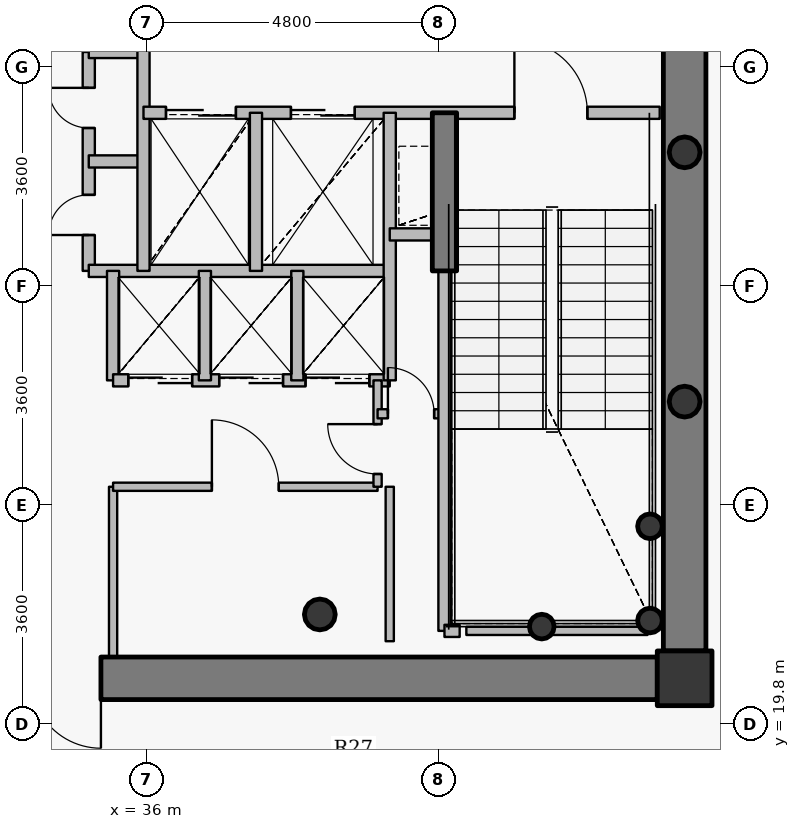
"""IFC4 building model, lengths in metres.
Left out: names, types, materials, properties, quantities, classifications, styles, units other than length and angle.
Written with IfcOpenShell. Run it as: python <this file> out.ifc"""

import sys

from ifc_helpers import new_model, si_unit, direction, frame, frame_2d, origin, origin_2d, place, context, subcontext, project, spatial, rectangle, hollow_circle, extrude, source, transform, mapped, element, fill, save


model = new_model("IFC4")
c1 = context("Model", 3, precision=1e-05, world=origin(), true_north=direction((0.0, 1.0)))
c2 = subcontext(c1, "Body", "Model", "MODEL_VIEW")
j1 = project(units=[si_unit("LENGTHUNIT", "METRE"), si_unit("PLANEANGLEUNIT", "RADIAN")], contexts=[c1])
p1 = place(None, origin())
s1 = spatial("IfcSite", under=j1, at=p1, CompositionType="ELEMENT")
p2 = place(p1, origin())
s2 = spatial("IfcBuilding", under=s1, at=p2, CompositionType="ELEMENT")
p3 = place(p2, frame((0.0, 0.0, 335.4)))
s3 = spatial("IfcBuildingStorey", under=s2, at=p3, CompositionType="ELEMENT", Elevation=335.4)
p4 = place(p3, frame((44.85, 20.55, 0.0), z_axis=(0.0, 0.0, 1.0), x_axis=(1.0, 0.0, 0.0)))
e1 = element("IfcColumn", 1, at=p4, inside=s3, PredefinedType="COLUMN", context=c2, shape_type="SweptSolid", body=[
    extrude(rectangle(XDim=0.9, YDim=0.9, at=origin_2d()), origin(), (0.0, 0.0, 1.0), 3.8),
])
p5 = place(p3, frame((38.85, 21.6, 0.0), z_axis=(0.0, 0.0, 1.0), x_axis=(1.0, 0.0, 0.0)))
e2 = element("IfcColumn", 2, at=p5, inside=s3, PredefinedType="COLUMN", context=c2, shape_type="SweptSolid", body=[
    extrude(hollow_circle(Radius=0.254, WallThickness=0.02, at=origin_2d()), origin(), (0.0, 0.0, 1.0), 3.8),
])
for number, where, z_axis, x_axis in (
    (3, (44.28, 21.5, 0.0), (0.0, 0.0, 1.0), (1.0, 0.0, 0.0)),
    (4, (44.28, 23.05, 0.0), (0.0, 0.0, 1.0), (1.0, 0.0, 0.0)),
    (5, (42.5, 21.4, 0.0), (0.0, 0.0, 1.0), (1.0, 0.0, 0.0)),
):
    element("IfcColumn", number, at=place(p3, frame(where, z_axis=z_axis, x_axis=x_axis)), inside=s3, PredefinedType="COLUMN", context=c2, shape_type="SweptSolid", body=[
        extrude(hollow_circle(Radius=0.203, WallThickness=0.016, at=origin_2d()), origin(), (0.0, 0.0, 1.0), 3.8),
    ])
p6 = place(p3, frame((44.85, 33.0, 0.0), z_axis=(0.0, 0.0, 1.0), x_axis=(0.0, -1.0, 0.0)))
e6 = element("IfcWall", 6, at=p6, inside=s3, PredefinedType="SHEAR", context=c2, shape_type="SweptSolid", body=[
    extrude(rectangle(XDim=12.0, YDim=0.7, at=frame_2d((6.0, 0.0))), origin(), (0.0, 0.0, 1.0), 3.1),
])
p7 = place(p3, frame((44.4, 20.55, 0.0), z_axis=(0.0, 0.0, 1.0), x_axis=(-1.0, 0.0, 0.0)))
e7 = element("IfcWall", 7, at=p7, inside=s3, PredefinedType="SHEAR", context=c2, shape_type="SweptSolid", body=[
    extrude(rectangle(XDim=16.8, YDim=0.7, at=frame_2d((8.4, 0.0))), origin(), (0.0, 0.0, 1.0), 3.1),
])
p8 = place(p7, frame((13.0, 0.0, 0.0)))
e8 = element("IfcOpeningElement", 8, at=p8, cuts=e7, PredefinedType="OPENING", context=c2, shape_type="SweptSolid", body=[
    extrude(rectangle(XDim=1.15, YDim=2.15, at=origin_2d()), frame((0.575, 0.36, 1.075), z_axis=(0.0, -1.0, 0.0), x_axis=(1.0, 0.0, 0.0)), (0.0, 0.0, 1.0), 0.72),
])
p9 = place(p7, frame((9.15, 0.0, 0.0)))
e9 = element("IfcOpeningElement", 9, at=p9, cuts=e7, PredefinedType="OPENING", context=c2, shape_type="SweptSolid", body=[
    extrude(rectangle(XDim=1.15, YDim=2.15, at=origin_2d()), frame((0.575, 0.36, 1.075), z_axis=(0.0, -1.0, 0.0), x_axis=(1.0, 0.0, 0.0)), (0.0, 0.0, 1.0), 0.72),
])
p10 = place(p3, frame((40.9, 27.25, 0.0), z_axis=(0.0, 0.0, 1.0), x_axis=(0.0, 1.0, 0.0)))
e10 = element("IfcWall", 10, at=p10, inside=s3, PredefinedType="SHEAR", context=c2, shape_type="SweptSolid", body=[
    extrude(rectangle(XDim=2.6, YDim=0.4, at=frame_2d((1.3, 0.0))), origin(), (0.0, 0.0, 1.0), 3.15),
])
for number, where, z_axis, x_axis in (
    (11, (44.85, 25.1, 0.0), (0.0, 0.0, 1.0), (1.0, 0.0, 0.0)),
    (12, (44.85, 29.2, 0.0), (0.0, 0.0, 1.0), (1.0, 0.0, 0.0)),
):
    element("IfcColumn", number, at=place(p3, frame(where, z_axis=z_axis, x_axis=x_axis)), inside=s3, PredefinedType="COLUMN", context=c2, shape_type="SweptSolid", body=[
        extrude(hollow_circle(Radius=0.254, WallThickness=0.02, at=origin_2d()), origin(), (0.0, 0.0, 1.0), 3.8),
    ])
p11 = place(p3, frame((35.05, 27.25, 0.0), z_axis=(0.0, 0.0, 1.0), x_axis=(0.0, 1.0, 0.0)))
e13 = element("IfcWall", 13, at=p11, inside=s3, PredefinedType="PARTITIONING", context=c2, shape_type="SweptSolid", body=[
    extrude(rectangle(XDim=3.6, YDim=0.2, at=frame_2d((1.8, 0.0))), origin(), (0.0, 0.0, 1.0), 3.55),
])
p12 = place(p11, frame((0.59, 0.0, 0.0)))
e14 = element("IfcOpeningElement", 14, at=p12, cuts=e13, PredefinedType="OPENING", context=c2, shape_type="SweptSolid", body=[
    extrude(rectangle(XDim=0.66, YDim=2.05, at=origin_2d()), frame((0.33, 0.11, 1.025), z_axis=(0.0, -1.0, 0.0), x_axis=(1.0, 0.0, 0.0)), (0.0, 0.0, 1.0), 0.22),
])
p13 = place(p11, frame((2.35, 0.0, 0.0)))
e15 = element("IfcOpeningElement", 15, at=p13, cuts=e13, PredefinedType="OPENING", context=c2, shape_type="SweptSolid", body=[
    extrude(rectangle(XDim=0.66, YDim=2.05, at=origin_2d()), frame((0.33, 0.11, 1.025), z_axis=(0.0, -1.0, 0.0), x_axis=(1.0, 0.0, 0.0)), (0.0, 0.0, 1.0), 0.22),
])
p14 = place(p3, frame((35.05, 27.25, 0.0), z_axis=(0.0, 0.0, 1.0), x_axis=(1.0, 0.0, 0.0)))
e16 = element("IfcWall", 16, at=p14, inside=s3, PredefinedType="PARTITIONING", context=c2, shape_type="SweptSolid", body=[
    extrude(rectangle(XDim=4.95, YDim=0.2, at=frame_2d((2.475, 0.0))), origin(), (0.0, 0.0, 1.0), 3.135),
])
for number, where, z_axis, x_axis in (
    (17, (35.05, 29.05, 0.0), (0.0, 0.0, 1.0), (1.0, 0.0, 0.0)),
    (18, (35.05, 30.85, 0.0), (0.0, 0.0, 1.0), (1.0, 0.0, 0.0)),
):
    element("IfcWall", number, at=place(p3, frame(where, z_axis=z_axis, x_axis=x_axis)), inside=s3, PredefinedType="PARTITIONING", context=c2, shape_type="SweptSolid", body=[
        extrude(rectangle(XDim=0.9, YDim=0.2, at=frame_2d((0.45, 0.0))), origin(), (0.0, 0.0, 1.0), 3.55),
    ])
p15 = place(p3, frame((35.45, 20.9, 0.0), z_axis=(0.0, 0.0, 1.0), x_axis=(0.0, 1.0, 0.0)))
e19 = element("IfcWall", 19, at=p15, inside=s3, PredefinedType="PARTITIONING", context=c2, shape_type="SweptSolid", body=[
    extrude(rectangle(XDim=2.8, YDim=0.135, at=frame_2d((1.4, 0.0))), origin(), (0.0, 0.0, 1.0), 3.135),
])
p16 = place(p3, frame((35.45, 23.7, 0.0), z_axis=(0.0, 0.0, 1.0), x_axis=(1.0, 0.0, 0.0)))
e20 = element("IfcWall", 20, at=p16, inside=s3, PredefinedType="PARTITIONING", context=c2, shape_type="SweptSolid", body=[
    extrude(rectangle(XDim=4.35, YDim=0.135, at=frame_2d((2.175, 0.0))), origin(), (0.0, 0.0, 1.0), 3.135),
])
p17 = place(p16, frame((1.625, 0.0, 0.0)))
e21 = element("IfcOpeningElement", 21, at=p17, cuts=e20, PredefinedType="OPENING", context=c2, shape_type="SweptSolid", body=[
    extrude(rectangle(XDim=1.1, YDim=2.15, at=origin_2d()), frame((0.55, 0.078, 1.075), z_axis=(0.0, -1.0, 0.0), x_axis=(1.0, 0.0, 0.0)), (0.0, 0.0, 1.0), 0.155),
])
p18 = place(p3, frame((35.45, 25.45, 0.0), z_axis=(0.0, 0.0, 1.0), x_axis=(0.0, 1.0, 0.0)))
e22 = element("IfcWall", 22, at=p18, inside=s3, PredefinedType="PARTITIONING", context=c2, shape_type="SweptSolid", body=[
    extrude(rectangle(XDim=1.8, YDim=0.2, at=frame_2d((0.9, 0.0))), origin(), (0.0, 0.0, 1.0), 3.55),
])
p19 = place(p3, frame((35.45, 25.45, 0.0), z_axis=(0.0, 0.0, 1.0), x_axis=(1.0, 0.0, 0.0)))
e23 = element("IfcWall", 23, at=p19, inside=s3, PredefinedType="PARTITIONING", context=c2, shape_type="SweptSolid", body=[
    extrude(rectangle(XDim=4.55, YDim=0.2, at=frame_2d((2.275, 0.0))), origin(), (0.0, 0.0, 1.0), 3.135),
])
p20 = place(p19, frame((0.25, 0.0, 0.0)))
e24 = element("IfcOpeningElement", 24, at=p20, cuts=e23, PredefinedType="OPENING", context=c2, shape_type="SweptSolid", body=[
    extrude(rectangle(XDim=1.05, YDim=2.15, at=origin_2d()), frame((0.525, 0.11, 1.075), z_axis=(0.0, -1.0, 0.0), x_axis=(1.0, 0.0, 0.0)), (0.0, 0.0, 1.0), 0.22),
])
p21 = place(p19, frame((1.745, 0.0, 0.0)))
e25 = element("IfcOpeningElement", 25, at=p21, cuts=e23, PredefinedType="OPENING", context=c2, shape_type="SweptSolid", body=[
    extrude(rectangle(XDim=1.05, YDim=2.15, at=origin_2d()), frame((0.525, 0.11, 1.075), z_axis=(0.0, -1.0, 0.0), x_axis=(1.0, 0.0, 0.0)), (0.0, 0.0, 1.0), 0.22),
])
p22 = place(p19, frame((3.165, 0.0, 0.0)))
e26 = element("IfcOpeningElement", 26, at=p22, cuts=e23, PredefinedType="OPENING", context=c2, shape_type="SweptSolid", body=[
    extrude(rectangle(XDim=1.05, YDim=2.15, at=origin_2d()), frame((0.525, 0.11, 1.075), z_axis=(0.0, -1.0, 0.0), x_axis=(1.0, 0.0, 0.0)), (0.0, 0.0, 1.0), 0.22),
])
p23 = place(p3, frame((35.95, 27.25, 0.0), z_axis=(0.0, 0.0, 1.0), x_axis=(0.0, 1.0, 0.0)))
e27 = element("IfcWall", 27, at=p23, inside=s3, PredefinedType="PARTITIONING", context=c2, shape_type="SweptSolid", body=[
    extrude(rectangle(XDim=3.8, YDim=0.2, at=frame_2d((1.9, 0.0))), origin(), (0.0, 0.0, 1.0), 3.55),
])
p24 = place(p3, frame((35.95, 29.85, 0.0), z_axis=(0.0, 0.0, 1.0), x_axis=(1.0, 0.0, 0.0)))
e28 = element("IfcWall", 28, at=p24, inside=s3, PredefinedType="PARTITIONING", context=c2, shape_type="SweptSolid", body=[
    extrude(rectangle(XDim=8.49, YDim=0.2, at=frame_2d((4.245, 0.0))), origin(), (0.0, 0.0, 1.0), 3.135),
])
p25 = place(p24, frame((6.1, 0.0, 0.0)))
e29 = element("IfcOpeningElement", 29, at=p25, cuts=e28, PredefinedType="OPENING", context=c2, shape_type="SweptSolid", body=[
    extrude(rectangle(XDim=1.2, YDim=2.15, at=origin_2d()), frame((0.6, 0.11, 1.075), z_axis=(0.0, -1.0, 0.0), x_axis=(1.0, 0.0, 0.0)), (0.0, 0.0, 1.0), 0.22),
])
p26 = place(p24, frame((0.37, 0.0, 0.0)))
e30 = element("IfcOpeningElement", 30, at=p26, cuts=e28, PredefinedType="OPENING", context=c2, shape_type="SweptSolid", body=[
    extrude(rectangle(XDim=1.15, YDim=2.15, at=origin_2d()), frame((0.575, 0.11, 1.075), z_axis=(0.0, -1.0, 0.0), x_axis=(1.0, 0.0, 0.0)), (0.0, 0.0, 1.0), 0.22),
])
p27 = place(p24, frame((2.425, 0.0, 0.0)))
e31 = element("IfcOpeningElement", 31, at=p27, cuts=e28, PredefinedType="OPENING", context=c2, shape_type="SweptSolid", body=[
    extrude(rectangle(XDim=1.05, YDim=2.15, at=origin_2d()), frame((0.525, 0.11, 1.075), z_axis=(0.0, -1.0, 0.0), x_axis=(1.0, 0.0, 0.0)), (0.0, 0.0, 1.0), 0.22),
])
p28 = place(p3, frame((36.96, 25.45, 0.0), z_axis=(0.0, 0.0, 1.0), x_axis=(0.0, 1.0, 0.0)))
e32 = element("IfcWall", 32, at=p28, inside=s3, PredefinedType="PARTITIONING", context=c2, shape_type="SweptSolid", body=[
    extrude(rectangle(XDim=1.8, YDim=0.2, at=frame_2d((0.9, 0.0))), origin(), (0.0, 0.0, 1.0), 3.55),
])
p29 = place(p3, frame((37.8, 27.25, 0.0), z_axis=(0.0, 0.0, 1.0), x_axis=(0.0, 1.0, 0.0)))
e33 = element("IfcWall", 33, at=p29, inside=s3, PredefinedType="PARTITIONING", context=c2, shape_type="SweptSolid", body=[
    extrude(rectangle(XDim=2.6, YDim=0.2, at=frame_2d((1.3, 0.0))), origin(), (0.0, 0.0, 1.0), 3.55),
])
p30 = place(p3, frame((38.48, 25.45, 0.0), z_axis=(0.0, 0.0, 1.0), x_axis=(0.0, 1.0, 0.0)))
e34 = element("IfcWall", 34, at=p30, inside=s3, PredefinedType="PARTITIONING", context=c2, shape_type="SweptSolid", body=[
    extrude(rectangle(XDim=1.8, YDim=0.2, at=frame_2d((0.9, 0.0))), origin(), (0.0, 0.0, 1.0), 3.55),
])
p31 = place(p3, frame((39.8, 23.7, 0.0), z_axis=(0.0, 0.0, 1.0), x_axis=(0.0, 1.0, 0.0)))
e35 = element("IfcWall", 35, at=p31, inside=s3, PredefinedType="PARTITIONING", context=c2, shape_type="SweptSolid", body=[
    extrude(rectangle(XDim=1.75, YDim=0.135, at=frame_2d((0.875, 0.0))), origin(), (0.0, 0.0, 1.0), 3.55),
])
p32 = place(p31, frame((0.21, 0.0, 0.0)))
e36 = element("IfcOpeningElement", 36, at=p32, cuts=e35, PredefinedType="OPENING", context=c2, shape_type="SweptSolid", body=[
    extrude(rectangle(XDim=0.82, YDim=2.1, at=origin_2d()), frame((0.41, 0.078, 1.05), z_axis=(0.0, -1.0, 0.0), x_axis=(1.0, 0.0, 0.0)), (0.0, 0.0, 1.0), 0.155),
])
p33 = place(p3, frame((39.8, 24.9, 0.0), z_axis=(0.0, 0.0, 1.0), x_axis=(1.0, 0.0, 0.0)))
e37 = element("IfcWall", 37, at=p33, inside=s3, PredefinedType="PARTITIONING", context=c2, shape_type="SweptSolid", body=[
    extrude(rectangle(XDim=1.1, YDim=0.15, at=frame_2d((0.55, 0.0))), origin(), (0.0, 0.0, 1.0), 3.55),
])
p34 = place(p33, frame((0.17, 0.0, 0.0)))
e38 = element("IfcOpeningElement", 38, at=p34, cuts=e37, PredefinedType="OPENING", context=c2, shape_type="SweptSolid", body=[
    extrude(rectangle(XDim=0.76, YDim=2.1, at=origin_2d()), frame((0.38, 0.085, 1.05), z_axis=(0.0, -1.0, 0.0), x_axis=(1.0, 0.0, 0.0)), (0.0, 0.0, 1.0), 0.17),
])
p35 = place(p3, frame((40.0, 25.45, 0.0), z_axis=(0.0, 0.0, 1.0), x_axis=(0.0, 1.0, 0.0)))
e39 = element("IfcWall", 39, at=p35, inside=s3, PredefinedType="PARTITIONING", context=c2, shape_type="SweptSolid", body=[
    extrude(rectangle(XDim=4.4, YDim=0.2, at=frame_2d((2.2, 0.0))), origin(), (0.0, 0.0, 1.0), 3.55),
])
p36 = place(p3, frame((40.0, 27.85, 0.0), z_axis=(0.0, 0.0, 1.0), x_axis=(1.0, 0.0, 0.0)))
e40 = element("IfcWall", 40, at=p36, inside=s3, PredefinedType="PARTITIONING", context=c2, shape_type="SweptSolid", body=[
    extrude(rectangle(XDim=0.9, YDim=0.2, at=frame_2d((0.45, 0.0))), origin(), (0.0, 0.0, 1.0), 3.55),
])
p37 = place(p3, frame((40.9, 21.33, 0.0), z_axis=(0.0, 0.0, 1.0), x_axis=(0.0, 1.0, 0.0)))
e41 = element("IfcWall", 41, at=p37, inside=s3, PredefinedType="PARTITIONING", context=c2, shape_type="SweptSolid", body=[
    extrude(rectangle(XDim=5.91, YDim=0.2, at=frame_2d((2.955, 0.0))), origin(), (0.0, 0.0, 1.0), 3.085),
])
p38 = place(p3, frame((40.9, 21.33, 0.0), z_axis=(0.0, 0.0, 1.0), x_axis=(1.0, 0.0, 0.0)))
e42 = element("IfcWall", 42, at=p38, inside=s3, PredefinedType="PARTITIONING", context=c2, shape_type="SweptSolid", body=[
    extrude(rectangle(XDim=0.25, YDim=0.2, at=frame_2d((0.125, 0.0))), origin(), (0.0, 0.0, 1.0), 3.085),
])
p39 = place(p3, frame((44.24, 21.33, 0.0), z_axis=(0.0, 0.0, 1.0), x_axis=(-1.0, 0.0, 0.0)))
e43 = element("IfcWall", 43, at=p39, inside=s3, PredefinedType="PARTITIONING", context=c2, shape_type="SweptSolid", body=[
    extrude(rectangle(XDim=2.98, YDim=0.135, at=frame_2d((1.49, 0.0))), origin(), (0.0, 0.0, 1.0), 3.085),
])
p40 = place(p3, frame((40.0, 23.7, 0.0), z_axis=(0.0, 0.0, 1.0), x_axis=(0.0, -1.0, 0.0)))
e44 = element("IfcWall", 44, at=p40, inside=s3, PredefinedType="PARTITIONING", context=c2, shape_type="SweptSolid", body=[
    extrude(rectangle(XDim=2.54, YDim=0.135, at=frame_2d((1.27, 0.0))), origin(), (0.0, 0.0, 1.0), 3.085),
])
p41 = place(p3, frame((44.41, 20.2, 0.0), z_axis=(0.0, 0.0, 1.0), x_axis=(1.0, 0.0, 0.0)))
e45 = element("IfcWall", 45, at=p41, inside=s3, PredefinedType="PARTITIONING", context=c2, shape_type="SweptSolid", body=[
    extrude(rectangle(XDim=0.79, YDim=0.135, at=frame_2d((0.395, 0.0))), origin(), (0.0, 0.0, 1.0), 2.25),
])
p42 = place(p3, frame((45.2, 20.508, 0.0), z_axis=(0.0, 0.0, 1.0), x_axis=(0.0, 1.0, 0.0)))
e46 = element("IfcWall", 46, at=p42, inside=s3, PredefinedType="PARTITIONING", context=c2, shape_type="SweptSolid", body=[
    extrude(rectangle(XDim=0.482, YDim=0.135, at=frame_2d((0.241, 0.0))), origin(), (0.0, 0.0, 1.0), 3.55),
])
m1 = source(origin(), c2, "Body", "SweptSolid", [
    extrude(rectangle(XDim=1.15, YDim=2.15, at=origin_2d()), frame((0.575, 0.025, 1.075), z_axis=(0.0, -1.0, 0.0), x_axis=(1.0, 0.0, 0.0)), (0.0, 0.0, 1.0), 0.05),
])
p43 = place(p9, origin())
e47 = element("IfcDoor", 47, at=p43, inside=s3, OperationType="SINGLE_SWING_LEFT", PredefinedType="DOOR", context=c2, shape_type="MappedRepresentation", body=[
    mapped(m1, transform((0.0, 0.0, 0.0), x_axis=(1.0, 0.0, 0.0), y_axis=(0.0, 1.0, 0.0), z_axis=(0.0, 0.0, 1.0), scale=1.0)),
])
fill(e9, e47)
m2 = source(origin(), c2, "Body", "SweptSolid", [
    extrude(rectangle(XDim=1.2, YDim=2.15, at=origin_2d()), frame((0.6, 0.025, 1.075), z_axis=(0.0, -1.0, 0.0), x_axis=(1.0, 0.0, 0.0)), (0.0, 0.0, 1.0), 0.05),
])
p44 = place(p25, origin())
e48 = element("IfcDoor", 48, at=p44, inside=s3, OperationType="SINGLE_SWING_LEFT", PredefinedType="DOOR", context=c2, shape_type="MappedRepresentation", body=[
    mapped(m2, transform((0.0, 0.0, 0.0), x_axis=(1.0, 0.0, 0.0), y_axis=(0.0, 1.0, 0.0), z_axis=(0.0, 0.0, 1.0), scale=1.0)),
])
fill(e29, e48)
m3 = source(origin(), c2, "Body", "SweptSolid", [
    extrude(rectangle(XDim=1.15, YDim=2.15, at=origin_2d()), frame((0.575, 0.025, 1.075), z_axis=(0.0, -1.0, 0.0), x_axis=(1.0, 0.0, 0.0)), (0.0, 0.0, 1.0), 0.05),
])
p45 = place(p26, origin())
e49 = element("IfcDoor", 49, at=p45, inside=s3, OperationType="DOUBLE_DOOR_SLIDING", PredefinedType="USERDEFINED", context=c2, shape_type="MappedRepresentation", body=[
    mapped(m3, transform((0.0, 0.0, 0.0), x_axis=(1.0, 0.0, 0.0), y_axis=(0.0, 1.0, 0.0), z_axis=(0.0, 0.0, 1.0), scale=1.0)),
])
fill(e30, e49)
m4 = source(origin(), c2, "Body", "SweptSolid", [
    extrude(rectangle(XDim=1.05, YDim=2.15, at=origin_2d()), frame((0.525, 0.025, 1.075), z_axis=(0.0, -1.0, 0.0), x_axis=(1.0, 0.0, 0.0)), (0.0, 0.0, 1.0), 0.05),
])
p46 = place(p27, origin())
e50 = element("IfcDoor", 50, at=p46, inside=s3, OperationType="DOUBLE_DOOR_SLIDING", PredefinedType="USERDEFINED", context=c2, shape_type="MappedRepresentation", body=[
    mapped(m4, transform((0.0, 0.0, 0.0), x_axis=(1.0, 0.0, 0.0), y_axis=(0.0, 1.0, 0.0), z_axis=(0.0, 0.0, 1.0), scale=1.0)),
])
fill(e31, e50)
p47 = place(p20, origin())
e51 = element("IfcDoor", 51, at=p47, inside=s3, OperationType="DOUBLE_DOOR_SLIDING", PredefinedType="USERDEFINED", context=c2, shape_type="MappedRepresentation", body=[
    mapped(m4, transform((0.0, 0.0, 0.0), x_axis=(1.0, 0.0, 0.0), y_axis=(0.0, 1.0, 0.0), z_axis=(0.0, 0.0, 1.0), scale=1.0)),
])
fill(e24, e51)
p48 = place(p21, origin())
e52 = element("IfcDoor", 52, at=p48, inside=s3, OperationType="DOUBLE_DOOR_SLIDING", PredefinedType="USERDEFINED", context=c2, shape_type="MappedRepresentation", body=[
    mapped(m4, transform((0.0, 0.0, 0.0), x_axis=(1.0, 0.0, 0.0), y_axis=(0.0, 1.0, 0.0), z_axis=(0.0, 0.0, 1.0), scale=1.0)),
])
fill(e25, e52)
p49 = place(p22, origin())
e53 = element("IfcDoor", 53, at=p49, inside=s3, OperationType="DOUBLE_DOOR_SLIDING", PredefinedType="USERDEFINED", context=c2, shape_type="MappedRepresentation", body=[
    mapped(m4, transform((0.0, 0.0, 0.0), x_axis=(1.0, 0.0, 0.0), y_axis=(0.0, 1.0, 0.0), z_axis=(0.0, 0.0, 1.0), scale=1.0)),
])
fill(e26, e53)
m5 = source(origin(), c2, "Body", "SweptSolid", [
    extrude(rectangle(XDim=0.66, YDim=2.05, at=origin_2d()), frame((0.33, 0.025, 1.025), z_axis=(0.0, -1.0, 0.0), x_axis=(1.0, 0.0, 0.0)), (0.0, 0.0, 1.0), 0.05),
])
p50 = place(p12, origin())
e54 = element("IfcDoor", 54, at=p50, inside=s3, OperationType="SINGLE_SWING_LEFT", PredefinedType="USERDEFINED", context=c2, shape_type="MappedRepresentation", body=[
    mapped(m5, transform((0.0, 0.0, 0.0), x_axis=(1.0, 0.0, 0.0), y_axis=(0.0, 1.0, 0.0), z_axis=(0.0, 0.0, 1.0), scale=1.0)),
])
fill(e14, e54)
p51 = place(p13, origin())
e55 = element("IfcDoor", 55, at=p51, inside=s3, OperationType="SINGLE_SWING_RIGHT", PredefinedType="USERDEFINED", context=c2, shape_type="MappedRepresentation", body=[
    mapped(m5, transform((0.0, 0.0, 0.0), x_axis=(1.0, 0.0, 0.0), y_axis=(0.0, 1.0, 0.0), z_axis=(0.0, 0.0, 1.0), scale=1.0)),
])
fill(e15, e55)
m6 = source(origin(), c2, "Body", "SweptSolid", [
    extrude(rectangle(XDim=1.1, YDim=2.15, at=origin_2d()), frame((0.55, 0.025, 1.075), z_axis=(0.0, -1.0, 0.0), x_axis=(1.0, 0.0, 0.0)), (0.0, 0.0, 1.0), 0.05),
])
p52 = place(p17, origin())
e56 = element("IfcDoor", 56, at=p52, inside=s3, OperationType="SINGLE_SWING_LEFT", PredefinedType="DOOR", context=c2, shape_type="MappedRepresentation", body=[
    mapped(m6, transform((0.0, 0.0, 0.0), x_axis=(1.0, 0.0, 0.0), y_axis=(0.0, 1.0, 0.0), z_axis=(0.0, 0.0, 1.0), scale=1.0)),
])
fill(e21, e56)
m7 = source(origin(), c2, "Body", "SweptSolid", [
    extrude(rectangle(XDim=0.82, YDim=2.1, at=origin_2d()), frame((0.41, 0.025, 1.05), z_axis=(0.0, -1.0, 0.0), x_axis=(1.0, 0.0, 0.0)), (0.0, 0.0, 1.0), 0.05),
])
p53 = place(p32, origin())
e57 = element("IfcDoor", 57, at=p53, inside=s3, OperationType="SINGLE_SWING_RIGHT", PredefinedType="DOOR", context=c2, shape_type="MappedRepresentation", body=[
    mapped(m7, transform((0.0, 0.0, 0.0), x_axis=(1.0, 0.0, 0.0), y_axis=(0.0, 1.0, 0.0), z_axis=(0.0, 0.0, 1.0), scale=1.0)),
])
fill(e36, e57)
m8 = source(origin(), c2, "Body", "SweptSolid", [
    extrude(rectangle(XDim=0.76, YDim=2.1, at=origin_2d()), frame((0.38, 0.025, 1.05), z_axis=(0.0, -1.0, 0.0), x_axis=(1.0, 0.0, 0.0)), (0.0, 0.0, 1.0), 0.05),
])
p54 = place(p34, origin())
e58 = element("IfcDoor", 58, at=p54, inside=s3, OperationType="SINGLE_SWING_LEFT", PredefinedType="DOOR", context=c2, shape_type="MappedRepresentation", body=[
    mapped(m8, transform((0.0, 0.0, 0.0), x_axis=(1.0, 0.0, 0.0), y_axis=(0.0, 1.0, 0.0), z_axis=(0.0, 0.0, 1.0), scale=1.0)),
])
fill(e38, e58)
save(model, sys.argv[1])
